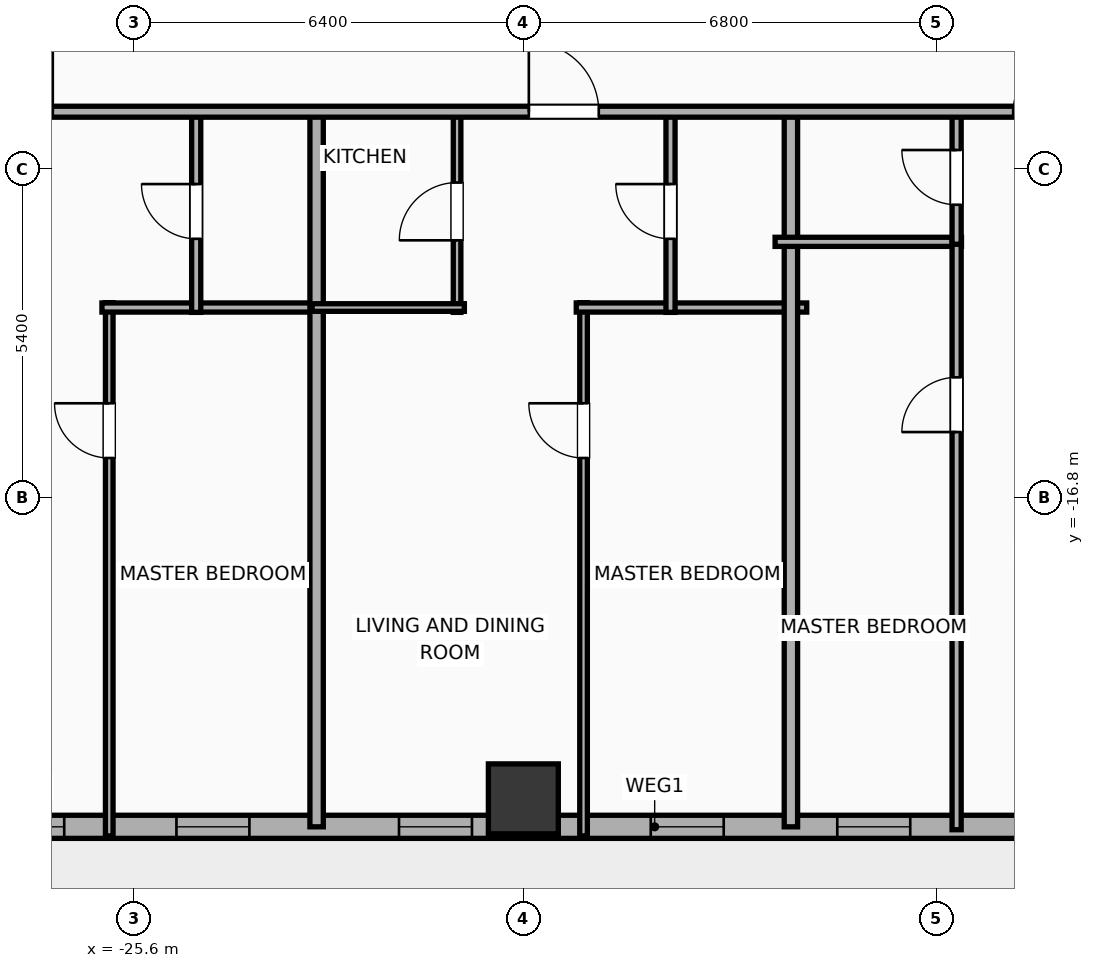
"""IFC4 building model, lengths in metres.
Left out: names, types, materials, properties, quantities, classifications, styles, units other than length and angle.
Written with IfcOpenShell. Run it as: python <this file> out.ifc"""

import sys

from ifc_helpers import new_model, si_unit, direction, frame, frame_2d, origin, origin_2d, place, context, subcontext, project, spatial, rectangle, hollow_rectangle, extrude, element, fill, save


model = new_model("IFC4")
c1 = context("Model", 3, precision=1e-05, world=origin(), true_north=direction((0.0, 1.0)))
c2 = subcontext(c1, "Body", "Model", "MODEL_VIEW")
j1 = project(units=[si_unit("LENGTHUNIT", "METRE"), si_unit("PLANEANGLEUNIT", "RADIAN")], contexts=[c1])
p1 = place(None, origin())
s1 = spatial("IfcSite", under=j1, at=p1, CompositionType="ELEMENT")
p2 = place(p1, origin())
s2 = spatial("IfcBuilding", under=s1, at=p2, CompositionType="ELEMENT")
p3 = place(p2, frame((0.0, 0.0, 26.0)))
s3 = spatial("IfcBuildingStorey", under=s2, at=p3, CompositionType="ELEMENT", Elevation=26.0)
p4 = place(p3, frame((-19.2, -21.75, -0.25), z_axis=(0.0, 0.0, 1.0), x_axis=(1.0, 0.0, 0.0)))
e1 = element("IfcColumn", 1, at=p4, inside=s3, PredefinedType="COLUMN", context=c2, shape_type="SweptSolid", body=[
    extrude(hollow_rectangle(XDim=1.15, YDim=1.15, WallThickness=0.04, at=origin_2d()), origin(), (0.0, 0.0, 1.0), 4.15),
])
p5 = place(p3, frame((22.381, -22.21, 0.0), z_axis=(0.0, 0.0, 1.0), x_axis=(-1.0, 0.0, 0.0)))
e2 = element("IfcWall", 2, at=p5, inside=s3, PredefinedType="ELEMENTEDWALL", context=c2, shape_type="SweptSolid", body=[
    extrude(rectangle(XDim=51.963, YDim=0.38, at=frame_2d((25.981, 0.0))), origin(), (0.0, 0.0, 1.0), 2.54),
])
p6 = place(p5, frame((25.231, 0.0, 0.0)))
e3 = element("IfcOpeningElement", 3, at=p6, cuts=e2, PredefinedType="OPENING", context=c2, shape_type="SweptSolid", body=[
    extrude(rectangle(XDim=1.5, YDim=2.05, at=frame_2d((0.75, 1.025))), frame((0.0, 0.2, 0.0), z_axis=(0.0, -1.0, 0.0), x_axis=(1.0, 0.0, 0.0)), (0.0, 0.0, 1.0), 0.4),
])
p7 = place(p5, frame((6.61, 0.0, 0.75)))
e4 = element("IfcOpeningElement", 4, at=p7, cuts=e2, PredefinedType="OPENING", context=c2, shape_type="SweptSolid", body=[
    extrude(rectangle(XDim=2.4, YDim=1.63, at=frame_2d((1.2, 0.815))), frame((0.0, 0.2, 0.0), z_axis=(0.0, -1.0, 0.0), x_axis=(1.0, 0.0, 0.0)), (0.0, 0.0, 1.0), 0.4),
])
p8 = place(p5, frame((49.132, 0.0, 0.75)))
e5 = element("IfcOpeningElement", 5, at=p8, cuts=e2, PredefinedType="OPENING", context=c2, shape_type="SweptSolid", body=[
    extrude(rectangle(XDim=1.2, YDim=1.63, at=frame_2d((0.6, 0.815))), frame((0.0, 0.2, 0.0), z_axis=(0.0, -1.0, 0.0), x_axis=(1.0, 0.0, 0.0)), (0.0, 0.0, 1.0), 0.4),
])
p9 = place(p5, frame((46.086, 0.0, 0.75)))
e6 = element("IfcOpeningElement", 6, at=p9, cuts=e2, PredefinedType="OPENING", context=c2, shape_type="SweptSolid", body=[
    extrude(rectangle(XDim=1.2, YDim=1.63, at=frame_2d((0.6, 0.815))), frame((0.0, 0.2, 0.0), z_axis=(0.0, -1.0, 0.0), x_axis=(1.0, 0.0, 0.0)), (0.0, 0.0, 1.0), 0.4),
])
p10 = place(p5, frame((42.426, 0.0, 0.75)))
e7 = element("IfcOpeningElement", 7, at=p10, cuts=e2, PredefinedType="OPENING", context=c2, shape_type="SweptSolid", body=[
    extrude(rectangle(XDim=1.2, YDim=1.63, at=frame_2d((0.6, 0.815))), frame((0.0, 0.2, 0.0), z_axis=(0.0, -1.0, 0.0), x_axis=(1.0, 0.0, 0.0)), (0.0, 0.0, 1.0), 0.4),
])
p11 = place(p5, frame((38.286, 0.0, 0.75)))
e8 = element("IfcOpeningElement", 8, at=p11, cuts=e2, PredefinedType="OPENING", context=c2, shape_type="SweptSolid", body=[
    extrude(rectangle(XDim=1.2, YDim=1.63, at=frame_2d((0.6, 0.815))), frame((0.0, 0.2, 0.0), z_axis=(0.0, -1.0, 0.0), x_axis=(1.0, 0.0, 0.0)), (0.0, 0.0, 1.0), 0.4),
])
p12 = place(p5, frame((35.219, 0.0, 0.75)))
e9 = element("IfcOpeningElement", 9, at=p12, cuts=e2, PredefinedType="OPENING", context=c2, shape_type="SweptSolid", body=[
    extrude(rectangle(XDim=1.2, YDim=1.63, at=frame_2d((0.6, 0.815))), frame((0.0, 0.2, 0.0), z_axis=(0.0, -1.0, 0.0), x_axis=(1.0, 0.0, 0.0)), (0.0, 0.0, 1.0), 0.4),
])
p13 = place(p5, frame((32.039, 0.0, 0.75)))
e10 = element("IfcOpeningElement", 10, at=p13, cuts=e2, PredefinedType="OPENING", context=c2, shape_type="SweptSolid", body=[
    extrude(rectangle(XDim=1.2, YDim=1.63, at=frame_2d((0.6, 0.815))), frame((0.0, 0.2, 0.0), z_axis=(0.0, -1.0, 0.0), x_axis=(1.0, 0.0, 0.0)), (0.0, 0.0, 1.0), 0.4),
])
p14 = place(p5, frame((22.686, 0.0, 0.75)))
e11 = element("IfcOpeningElement", 11, at=p14, cuts=e2, PredefinedType="OPENING", context=c2, shape_type="SweptSolid", body=[
    extrude(rectangle(XDim=1.2, YDim=1.63, at=frame_2d((0.6, 0.815))), frame((0.0, 0.2, 0.0), z_axis=(0.0, -1.0, 0.0), x_axis=(1.0, 0.0, 0.0)), (0.0, 0.0, 1.0), 0.4),
])
p15 = place(p5, frame((18.786, 0.0, 0.75)))
e12 = element("IfcOpeningElement", 12, at=p15, cuts=e2, PredefinedType="OPENING", context=c2, shape_type="SweptSolid", body=[
    extrude(rectangle(XDim=1.2, YDim=1.63, at=frame_2d((0.6, 0.815))), frame((0.0, 0.2, 0.0), z_axis=(0.0, -1.0, 0.0), x_axis=(1.0, 0.0, 0.0)), (0.0, 0.0, 1.0), 0.4),
])
p16 = place(p5, frame((14.886, 0.0, 0.75)))
e13 = element("IfcOpeningElement", 13, at=p16, cuts=e2, PredefinedType="OPENING", context=c2, shape_type="SweptSolid", body=[
    extrude(rectangle(XDim=1.2, YDim=1.63, at=frame_2d((0.6, 0.815))), frame((0.0, 0.2, 0.0), z_axis=(0.0, -1.0, 0.0), x_axis=(1.0, 0.0, 0.0)), (0.0, 0.0, 1.0), 0.4),
])
p17 = place(p5, frame((11.826, 0.0, 0.75)))
e14 = element("IfcOpeningElement", 14, at=p17, cuts=e2, PredefinedType="OPENING", context=c2, shape_type="SweptSolid", body=[
    extrude(rectangle(XDim=1.2, YDim=1.63, at=frame_2d((0.6, 0.815))), frame((0.0, 0.2, 0.0), z_axis=(0.0, -1.0, 0.0), x_axis=(1.0, 0.0, 0.0)), (0.0, 0.0, 1.0), 0.4),
])
p18 = place(p5, frame((2.836, 0.0, 0.75)))
e15 = element("IfcOpeningElement", 15, at=p18, cuts=e2, PredefinedType="OPENING", context=c2, shape_type="SweptSolid", body=[
    extrude(rectangle(XDim=1.2, YDim=1.63, at=frame_2d((0.6, 0.815))), frame((0.0, 0.2, 0.0), z_axis=(0.0, -1.0, 0.0), x_axis=(1.0, 0.0, 0.0)), (0.0, 0.0, 1.0), 0.4),
])
p19 = place(p3, frame((-26.01, -22.36, 0.0), z_axis=(0.0, 0.0, 1.0), x_axis=(0.0, 1.0, 0.0)))
e16 = element("IfcWall", 16, at=p19, inside=s3, PredefinedType="PARTITIONING", context=c2, shape_type="SweptSolid", body=[
    extrude(rectangle(XDim=8.77, YDim=0.125, at=frame_2d((4.385, 0.0))), origin(), (0.0, 0.0, 1.0), 3.65),
])
p20 = place(p19, frame((6.215, 0.0, 0.0)))
e17 = element("IfcOpeningElement", 17, at=p20, cuts=e16, PredefinedType="OPENING", context=c2, shape_type="SweptSolid", body=[
    extrude(rectangle(XDim=0.9, YDim=2.05, at=frame_2d((0.45, 1.025))), frame((0.0, 0.073, 0.0), z_axis=(0.0, -1.0, 0.0), x_axis=(1.0, 0.0, 0.0)), (0.0, 0.0, 1.0), 0.145),
])
p21 = place(p3, frame((-26.13, -13.67, 0.0), z_axis=(0.0, 0.0, 1.0), x_axis=(1.0, 0.0, 0.0)))
e18 = element("IfcWall", 18, at=p21, inside=s3, PredefinedType="PLUMBINGWALL", context=c2, shape_type="SweptSolid", body=[
    extrude(rectangle(XDim=3.605, YDim=0.15, at=frame_2d((1.802, 0.0))), origin(), (0.0, 0.0, 1.0), 3.65),
])
p22 = place(p3, frame((-24.58, -13.75, 0.0), z_axis=(0.0, 0.0, 1.0), x_axis=(0.0, 1.0, 0.0)))
e19 = element("IfcWall", 19, at=p22, inside=s3, PredefinedType="PLUMBINGWALL", context=c2, shape_type="SweptSolid", body=[
    extrude(rectangle(XDim=3.32, YDim=0.15, at=frame_2d((1.66, 0.0))), origin(), (0.0, 0.0, 1.0), 3.65),
])
p23 = place(p22, frame((1.21, 0.0, 0.0)))
e20 = element("IfcOpeningElement", 20, at=p23, cuts=e19, PredefinedType="OPENING", context=c2, shape_type="SweptSolid", body=[
    extrude(rectangle(XDim=0.9, YDim=2.05, at=frame_2d((0.45, 1.025))), frame((0.0, 0.085, 0.0), z_axis=(0.0, -1.0, 0.0), x_axis=(1.0, 0.0, 0.0)), (0.0, 0.0, 1.0), 0.17),
])
p24 = place(p3, frame((-22.6, -22.21, 0.0), z_axis=(0.0, 0.0, 1.0), x_axis=(0.0, 1.0, 0.0)))
e21 = element("IfcWall", 21, at=p24, inside=s3, PredefinedType="PARTITIONING", context=c2, shape_type="SweptSolid", body=[
    extrude(rectangle(XDim=11.84, YDim=0.22, at=frame_2d((5.92, 0.0))), origin(), (0.0, 0.0, 1.0), 3.65),
])
p25 = place(p3, frame((-18.21, -22.36, 0.0), z_axis=(0.0, 0.0, 1.0), x_axis=(0.0, 1.0, 0.0)))
e22 = element("IfcWall", 22, at=p25, inside=s3, PredefinedType="PARTITIONING", context=c2, shape_type="SweptSolid", body=[
    extrude(rectangle(XDim=8.77, YDim=0.125, at=frame_2d((4.385, 0.0))), origin(), (0.0, 0.0, 1.0), 3.65),
])
p26 = place(p25, frame((6.215, 0.0, 0.0)))
e23 = element("IfcOpeningElement", 23, at=p26, cuts=e22, PredefinedType="OPENING", context=c2, shape_type="SweptSolid", body=[
    extrude(rectangle(XDim=0.9, YDim=2.05, at=frame_2d((0.45, 1.025))), frame((0.0, 0.073, 0.0), z_axis=(0.0, -1.0, 0.0), x_axis=(1.0, 0.0, 0.0)), (0.0, 0.0, 1.0), 0.145),
])
p27 = place(p3, frame((-18.33, -13.67, 0.0), z_axis=(0.0, 0.0, 1.0), x_axis=(1.0, 0.0, 0.0)))
e24 = element("IfcWall", 24, at=p27, inside=s3, PredefinedType="PLUMBINGWALL", context=c2, shape_type="SweptSolid", body=[
    extrude(rectangle(XDim=3.79, YDim=0.15, at=frame_2d((1.895, 0.0))), origin(), (0.0, 0.0, 1.0), 3.65),
])
p28 = place(p3, frame((-20.29, -13.75, 0.0), z_axis=(0.0, 0.0, 1.0), x_axis=(0.0, 1.0, 0.0)))
e25 = element("IfcWall", 25, at=p28, inside=s3, PredefinedType="PARTITIONING", context=c2, shape_type="SweptSolid", body=[
    extrude(rectangle(XDim=3.32, YDim=0.125, at=frame_2d((1.66, 0.0))), origin(), (0.0, 0.0, 1.0), 3.65),
])
p29 = place(p28, frame((1.185, 0.0, 0.0)))
e26 = element("IfcOpeningElement", 26, at=p29, cuts=e25, PredefinedType="OPENING", context=c2, shape_type="SweptSolid", body=[
    extrude(rectangle(XDim=0.95, YDim=2.05, at=frame_2d((0.475, 1.025))), frame((0.0, 0.073, 0.0), z_axis=(0.0, -1.0, 0.0), x_axis=(1.0, 0.0, 0.0)), (0.0, 0.0, 1.0), 0.145),
])
p30 = place(p3, frame((-22.675, -13.67, 0.0), z_axis=(0.0, 0.0, 1.0), x_axis=(1.0, 0.0, 0.0)))
e27 = element("IfcWall", 27, at=p30, inside=s3, PredefinedType="PARTITIONING", context=c2, shape_type="SweptSolid", body=[
    extrude(rectangle(XDim=2.505, YDim=0.125, at=frame_2d((1.252, 0.0))), origin(), (0.0, 0.0, 1.0), 3.65),
])
p31 = place(p3, frame((-16.78, -13.75, 0.0), z_axis=(0.0, 0.0, 1.0), x_axis=(0.0, 1.0, 0.0)))
e28 = element("IfcWall", 28, at=p31, inside=s3, PredefinedType="PLUMBINGWALL", context=c2, shape_type="SweptSolid", body=[
    extrude(rectangle(XDim=3.32, YDim=0.15, at=frame_2d((1.66, 0.0))), origin(), (0.0, 0.0, 1.0), 3.65),
])
p32 = place(p31, frame((1.21, 0.0, 0.0)))
e29 = element("IfcOpeningElement", 29, at=p32, cuts=e28, PredefinedType="OPENING", context=c2, shape_type="SweptSolid", body=[
    extrude(rectangle(XDim=0.9, YDim=2.05, at=frame_2d((0.45, 1.025))), frame((0.0, 0.085, 0.0), z_axis=(0.0, -1.0, 0.0), x_axis=(1.0, 0.0, 0.0)), (0.0, 0.0, 1.0), 0.17),
])
p33 = place(p3, frame((-14.8, -22.21, 0.0), z_axis=(0.0, 0.0, 1.0), x_axis=(0.0, 1.0, 0.0)))
e30 = element("IfcWall", 30, at=p33, inside=s3, PredefinedType="PARTITIONING", context=c2, shape_type="SweptSolid", body=[
    extrude(rectangle(XDim=11.84, YDim=0.22, at=frame_2d((5.92, 0.0))), origin(), (0.0, 0.0, 1.0), 3.65),
])
p34 = place(p3, frame((-15.06, -12.59, 0.0), z_axis=(0.0, 0.0, 1.0), x_axis=(1.0, 0.0, 0.0)))
e31 = element("IfcWall", 31, at=p34, inside=s3, PredefinedType="PLUMBINGWALL", context=c2, shape_type="SweptSolid", body=[
    extrude(rectangle(XDim=3.065, YDim=0.15, at=frame_2d((1.532, 0.0))), origin(), (0.0, 0.0, 1.0), 3.65),
])
p35 = place(p3, frame((-12.075, -22.258, 0.0), z_axis=(0.0, 0.0, 1.0), x_axis=(0.0, 1.0, 0.0)))
e32 = element("IfcWall", 32, at=p35, inside=s3, PredefinedType="PLUMBINGWALL", context=c2, shape_type="SweptSolid", body=[
    extrude(rectangle(XDim=9.708, YDim=0.15, at=frame_2d((4.854, 0.0))), origin(), (0.0, 0.0, 1.0), 3.65),
])
p36 = place(p35, frame((6.54, 0.0, 0.0)))
e33 = element("IfcOpeningElement", 33, at=p36, cuts=e32, PredefinedType="OPENING", context=c2, shape_type="SweptSolid", body=[
    extrude(rectangle(XDim=0.9, YDim=2.05, at=frame_2d((0.45, 1.025))), frame((0.0, 0.085, 0.0), z_axis=(0.0, -1.0, 0.0), x_axis=(1.0, 0.0, 0.0)), (0.0, 0.0, 1.0), 0.17),
])
p37 = place(p3, frame((-12.075, -12.63, 0.0), z_axis=(0.0, 0.0, 1.0), x_axis=(0.0, 1.0, 0.0)))
e34 = element("IfcWall", 34, at=p37, inside=s3, PredefinedType="PLUMBINGWALL", context=c2, shape_type="SweptSolid", body=[
    extrude(rectangle(XDim=2.2, YDim=0.15, at=frame_2d((1.1, 0.0))), origin(), (0.0, 0.0, 1.0), 2.54),
])
p38 = place(p37, frame((0.65, 0.0, 0.0)))
e35 = element("IfcOpeningElement", 35, at=p38, cuts=e34, PredefinedType="OPENING", context=c2, shape_type="SweptSolid", body=[
    extrude(rectangle(XDim=0.9, YDim=2.05, at=frame_2d((0.45, 1.025))), frame((0.0, 0.085, 0.0), z_axis=(0.0, -1.0, 0.0), x_axis=(1.0, 0.0, 0.0)), (0.0, 0.0, 1.0), 0.17),
])
p39 = place(p3, frame((-33.41, -10.45, 0.0), z_axis=(0.0, 0.0, 1.0), x_axis=(1.0, 0.0, 0.0)))
e36 = element("IfcWall", 36, at=p39, inside=s3, PredefinedType="PARTITIONING", context=c2, shape_type="SweptSolid", body=[
    extrude(rectangle(XDim=59.62, YDim=0.18, at=frame_2d((29.81, 0.0))), origin(), (0.0, 0.0, 1.0), 3.65),
])
p40 = place(p39, frame((5.321, 0.0, 0.0)))
e37 = element("IfcOpeningElement", 37, at=p40, cuts=e36, PredefinedType="OPENING", context=c2, shape_type="SweptSolid", body=[
    extrude(rectangle(XDim=1.15, YDim=2.05, at=frame_2d((0.575, 1.025))), frame((0.0, 0.1, 0.0), z_axis=(0.0, -1.0, 0.0), x_axis=(1.0, 0.0, 0.0)), (0.0, 0.0, 1.0), 0.2),
])
p41 = place(p39, frame((14.3, 0.0, 0.0)))
e38 = element("IfcOpeningElement", 38, at=p41, cuts=e36, PredefinedType="OPENING", context=c2, shape_type="SweptSolid", body=[
    extrude(rectangle(XDim=1.15, YDim=2.05, at=frame_2d((0.575, 1.025))), frame((0.0, 0.1, 0.0), z_axis=(0.0, -1.0, 0.0), x_axis=(1.0, 0.0, 0.0)), (0.0, 0.0, 1.0), 0.2),
])
p42 = place(p39, frame((22.265, 0.0, 0.0)))
e39 = element("IfcOpeningElement", 39, at=p42, cuts=e36, PredefinedType="OPENING", context=c2, shape_type="SweptSolid", body=[
    extrude(rectangle(XDim=0.9, YDim=2.05, at=frame_2d((0.45, 1.025))), frame((0.0, 0.1, 0.0), z_axis=(0.0, -1.0, 0.0), x_axis=(1.0, 0.0, 0.0)), (0.0, 0.0, 1.0), 0.2),
])
p43 = place(p39, frame((29.903, 0.0, 0.0)))
e40 = element("IfcOpeningElement", 40, at=p43, cuts=e36, PredefinedType="OPENING", context=c2, shape_type="SweptSolid", body=[
    extrude(rectangle(XDim=1.15, YDim=2.05, at=frame_2d((0.575, 1.025))), frame((0.0, 0.1, 0.0), z_axis=(0.0, -1.0, 0.0), x_axis=(1.0, 0.0, 0.0)), (0.0, 0.0, 1.0), 0.2),
])
p44 = place(p39, frame((37.701, 0.0, 0.0)))
e41 = element("IfcOpeningElement", 41, at=p44, cuts=e36, PredefinedType="OPENING", context=c2, shape_type="SweptSolid", body=[
    extrude(rectangle(XDim=1.15, YDim=2.05, at=frame_2d((0.575, 1.025))), frame((0.0, 0.1, 0.0), z_axis=(0.0, -1.0, 0.0), x_axis=(1.0, 0.0, 0.0)), (0.0, 0.0, 1.0), 0.2),
])
p45 = place(p39, frame((45.654, 0.0, 0.0)))
e42 = element("IfcOpeningElement", 42, at=p45, cuts=e36, PredefinedType="OPENING", context=c2, shape_type="SweptSolid", body=[
    extrude(rectangle(XDim=0.9, YDim=2.05, at=frame_2d((0.45, 1.025))), frame((0.0, 0.1, 0.0), z_axis=(0.0, -1.0, 0.0), x_axis=(1.0, 0.0, 0.0)), (0.0, 0.0, 1.0), 0.2),
])
p46 = place(p39, frame((54.472, 0.0, 0.0)))
e43 = element("IfcOpeningElement", 43, at=p46, cuts=e36, PredefinedType="OPENING", context=c2, shape_type="SweptSolid", body=[
    extrude(rectangle(XDim=1.15, YDim=2.05, at=frame_2d((0.575, 1.025))), frame((0.0, 0.1, 0.0), z_axis=(0.0, -1.0, 0.0), x_axis=(1.0, 0.0, 0.0)), (0.0, 0.0, 1.0), 0.2),
])
p47 = place(p8, origin())
e44 = element("IfcWindow", 44, at=p47, inside=s3, PartitioningType="SINGLE_PANEL", PredefinedType="WINDOW", context=c2, shape_type="SweptSolid", body=[
    extrude(rectangle(XDim=1.2, YDim=1.63, at=frame_2d((0.6, 0.815))), frame((0.0, 0.03, 0.0), z_axis=(0.0, -1.0, 0.0), x_axis=(1.0, 0.0, 0.0)), (0.0, 0.0, 1.0), 0.06),
])
fill(e5, e44)
p48 = place(p9, origin())
e45 = element("IfcWindow", 45, at=p48, inside=s3, PartitioningType="SINGLE_PANEL", PredefinedType="WINDOW", context=c2, shape_type="SweptSolid", body=[
    extrude(rectangle(XDim=1.2, YDim=1.63, at=frame_2d((0.6, 0.815))), frame((0.0, 0.03, 0.0), z_axis=(0.0, -1.0, 0.0), x_axis=(1.0, 0.0, 0.0)), (0.0, 0.0, 1.0), 0.06),
])
fill(e6, e45)
p49 = place(p10, origin())
e46 = element("IfcWindow", 46, at=p49, inside=s3, PartitioningType="SINGLE_PANEL", PredefinedType="WINDOW", context=c2, shape_type="SweptSolid", body=[
    extrude(rectangle(XDim=1.2, YDim=1.63, at=frame_2d((0.6, 0.815))), frame((0.0, 0.03, 0.0), z_axis=(0.0, -1.0, 0.0), x_axis=(1.0, 0.0, 0.0)), (0.0, 0.0, 1.0), 0.06),
])
fill(e7, e46)
p50 = place(p11, origin())
e47 = element("IfcWindow", 47, at=p50, inside=s3, PartitioningType="SINGLE_PANEL", PredefinedType="WINDOW", context=c2, shape_type="SweptSolid", body=[
    extrude(rectangle(XDim=1.2, YDim=1.63, at=frame_2d((0.6, 0.815))), frame((0.0, 0.03, 0.0), z_axis=(0.0, -1.0, 0.0), x_axis=(1.0, 0.0, 0.0)), (0.0, 0.0, 1.0), 0.06),
])
fill(e8, e47)
p51 = place(p12, origin())
e48 = element("IfcWindow", 48, at=p51, inside=s3, PartitioningType="SINGLE_PANEL", PredefinedType="WINDOW", context=c2, shape_type="SweptSolid", body=[
    extrude(rectangle(XDim=1.2, YDim=1.63, at=frame_2d((0.6, 0.815))), frame((0.0, 0.03, 0.0), z_axis=(0.0, -1.0, 0.0), x_axis=(1.0, 0.0, 0.0)), (0.0, 0.0, 1.0), 0.06),
])
fill(e9, e48)
p52 = place(p20, origin())
e49 = element("IfcDoor", 49, at=p52, inside=s3, OperationType="SINGLE_SWING_RIGHT", PredefinedType="DOOR", context=c2, shape_type="SweptSolid", body=[
    extrude(rectangle(XDim=0.9, YDim=2.05, at=frame_2d((0.45, 1.025))), frame((0.0, 0.025, 0.0), z_axis=(0.0, -1.0, 0.0), x_axis=(1.0, 0.0, 0.0)), (0.0, 0.0, 1.0), 0.05),
])
fill(e17, e49)
p53 = place(p23, origin())
e50 = element("IfcDoor", 50, at=p53, inside=s3, OperationType="SINGLE_SWING_RIGHT", PredefinedType="DOOR", context=c2, shape_type="SweptSolid", body=[
    extrude(rectangle(XDim=0.9, YDim=2.05, at=frame_2d((0.45, 1.025))), frame((0.0, 0.025, 0.0), z_axis=(0.0, -1.0, 0.0), x_axis=(1.0, 0.0, 0.0)), (0.0, 0.0, 1.0), 0.05),
])
fill(e20, e50)
p54 = place(p26, origin())
e51 = element("IfcDoor", 51, at=p54, inside=s3, OperationType="SINGLE_SWING_RIGHT", PredefinedType="DOOR", context=c2, shape_type="SweptSolid", body=[
    extrude(rectangle(XDim=0.9, YDim=2.05, at=frame_2d((0.45, 1.025))), frame((0.0, 0.025, 0.0), z_axis=(0.0, -1.0, 0.0), x_axis=(1.0, 0.0, 0.0)), (0.0, 0.0, 1.0), 0.05),
])
fill(e23, e51)
p55 = place(p29, origin())
e52 = element("IfcDoor", 52, at=p55, inside=s3, OperationType="SINGLE_SWING_LEFT", PredefinedType="DOOR", context=c2, shape_type="SweptSolid", body=[
    extrude(rectangle(XDim=0.95, YDim=2.05, at=frame_2d((0.475, 1.025))), frame((0.0, 0.025, 0.0), z_axis=(0.0, -1.0, 0.0), x_axis=(1.0, 0.0, 0.0)), (0.0, 0.0, 1.0), 0.05),
])
fill(e26, e52)
p56 = place(p32, origin())
e53 = element("IfcDoor", 53, at=p56, inside=s3, OperationType="SINGLE_SWING_RIGHT", PredefinedType="DOOR", context=c2, shape_type="SweptSolid", body=[
    extrude(rectangle(XDim=0.9, YDim=2.05, at=frame_2d((0.45, 1.025))), frame((0.0, 0.025, 0.0), z_axis=(0.0, -1.0, 0.0), x_axis=(1.0, 0.0, 0.0)), (0.0, 0.0, 1.0), 0.05),
])
fill(e29, e53)
p57 = place(p36, origin())
e54 = element("IfcDoor", 54, at=p57, inside=s3, OperationType="SINGLE_SWING_LEFT", PredefinedType="DOOR", context=c2, shape_type="SweptSolid", body=[
    extrude(rectangle(XDim=0.9, YDim=2.05, at=frame_2d((0.45, 1.025))), frame((0.0, 0.025, 0.0), z_axis=(0.0, -1.0, 0.0), x_axis=(1.0, 0.0, 0.0)), (0.0, 0.0, 1.0), 0.05),
])
fill(e33, e54)
p58 = place(p38, origin())
e55 = element("IfcDoor", 55, at=p58, inside=s3, OperationType="SINGLE_SWING_RIGHT", PredefinedType="DOOR", context=c2, shape_type="SweptSolid", body=[
    extrude(rectangle(XDim=0.9, YDim=2.05, at=frame_2d((0.45, 1.025))), frame((0.0, 0.025, 0.0), z_axis=(0.0, -1.0, 0.0), x_axis=(1.0, 0.0, 0.0)), (0.0, 0.0, 1.0), 0.05),
])
fill(e35, e55)
p59 = place(p40, origin())
e56 = element("IfcDoor", 56, at=p59, inside=s3, OperationType="SINGLE_SWING_RIGHT", PredefinedType="DOOR", context=c2, shape_type="SweptSolid", body=[
    extrude(rectangle(XDim=1.15, YDim=2.05, at=frame_2d((0.575, 1.025))), frame((0.0, 0.025, 0.0), z_axis=(0.0, -1.0, 0.0), x_axis=(1.0, 0.0, 0.0)), (0.0, 0.0, 1.0), 0.05),
])
fill(e37, e56)
p60 = place(p41, origin())
e57 = element("IfcDoor", 57, at=p60, inside=s3, OperationType="SINGLE_SWING_LEFT", PredefinedType="DOOR", context=c2, shape_type="SweptSolid", body=[
    extrude(rectangle(XDim=1.15, YDim=2.05, at=frame_2d((0.575, 1.025))), frame((0.0, 0.025, 0.0), z_axis=(0.0, -1.0, 0.0), x_axis=(1.0, 0.0, 0.0)), (0.0, 0.0, 1.0), 0.05),
])
fill(e38, e57)
p61 = place(p42, origin())
e58 = element("IfcDoor", 58, at=p61, inside=s3, OperationType="SINGLE_SWING_RIGHT", PredefinedType="DOOR", context=c2, shape_type="SweptSolid", body=[
    extrude(rectangle(XDim=0.9, YDim=2.05, at=frame_2d((0.45, 1.025))), frame((0.0, 0.025, 0.0), z_axis=(0.0, -1.0, 0.0), x_axis=(1.0, 0.0, 0.0)), (0.0, 0.0, 1.0), 0.05),
])
fill(e39, e58)
save(model, sys.argv[1])
